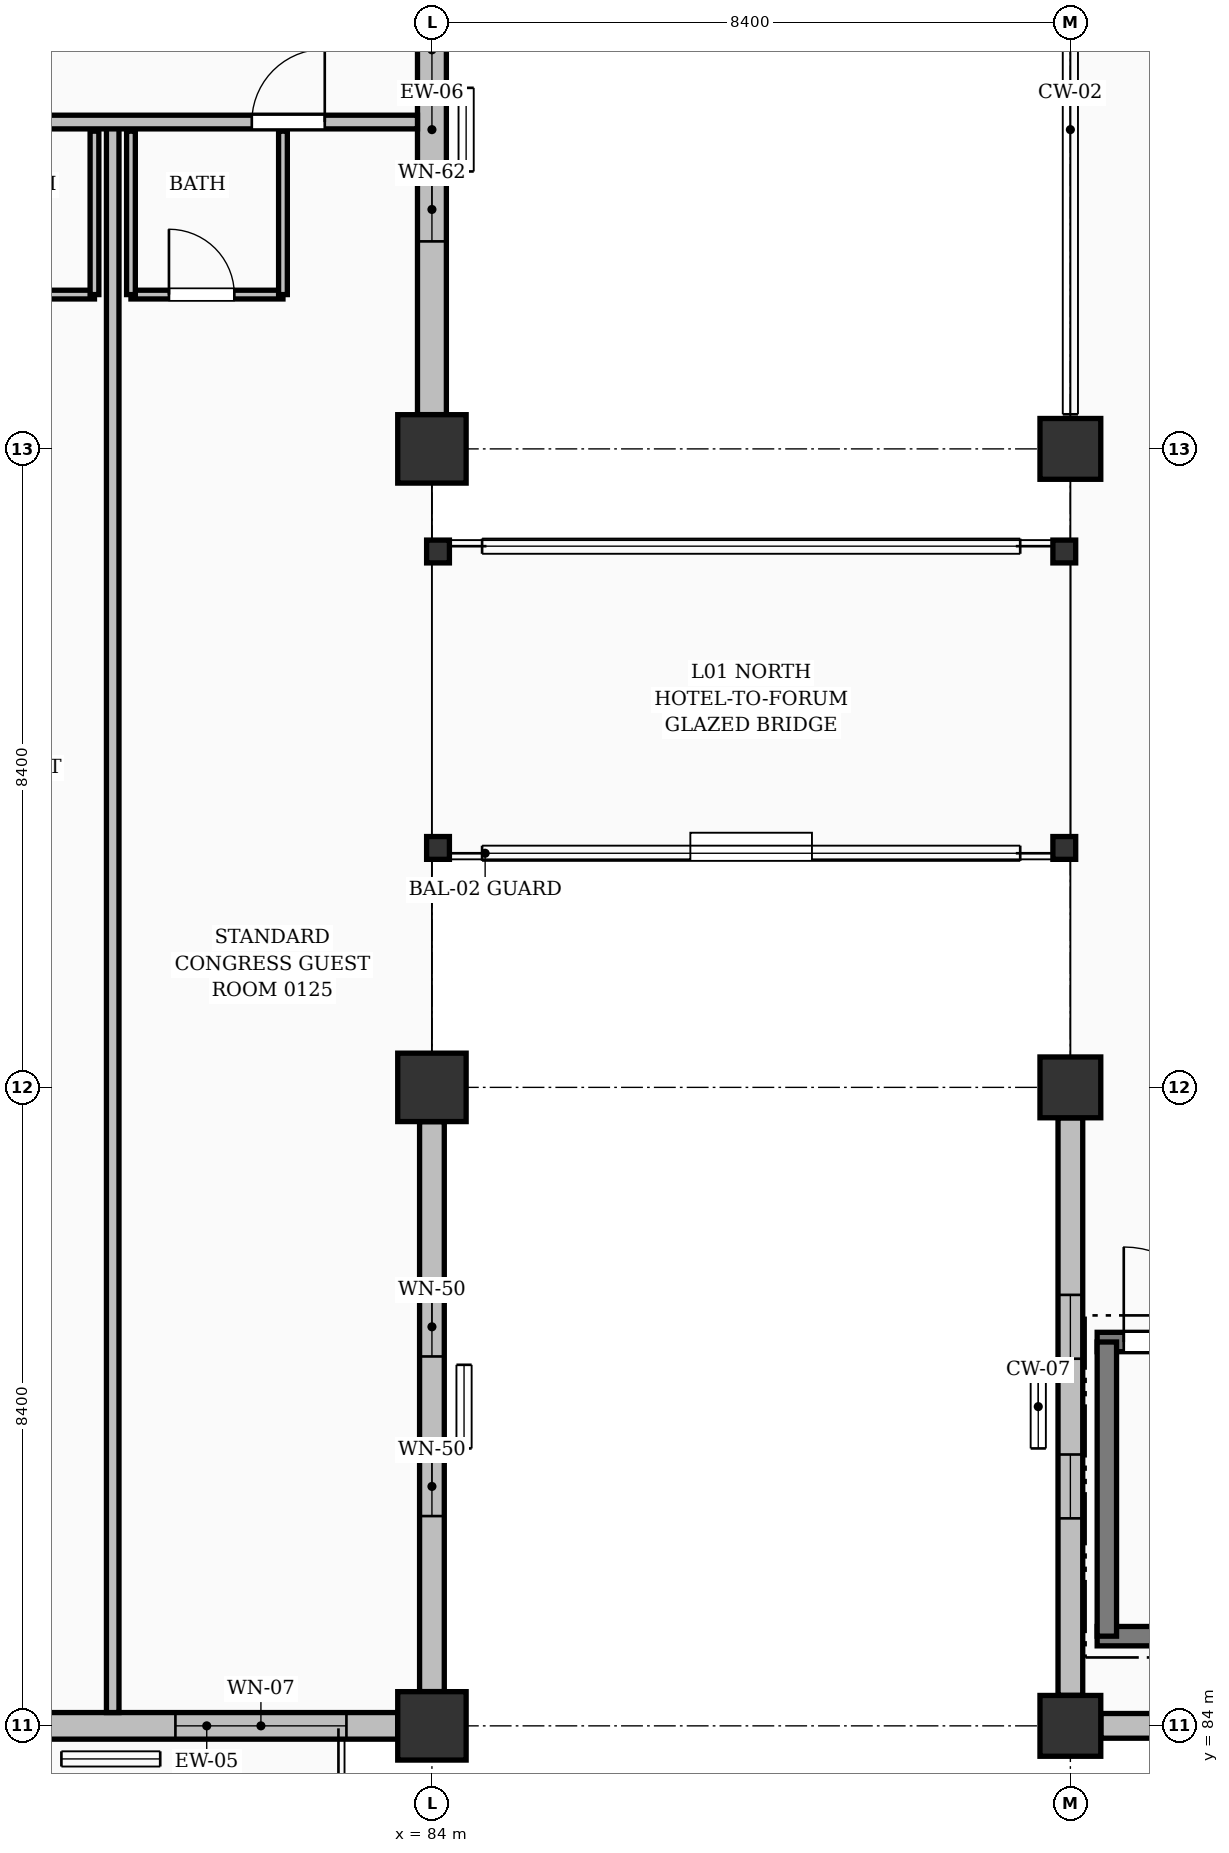
"""IFC4 building model, lengths in metres.
Left out: names, types, materials, properties, quantities, classifications, styles, units other than length and angle.
Written with IfcOpenShell. Run it as: python <this file> out.ifc"""

import sys

from ifc_helpers import new_model, si_unit, direction, frame, frame_2d, origin, origin_2d, place, context, subcontext, project, spatial, rectangle, hollow_rectangle, extrude, element, fill, save


model = new_model("IFC4")
c1 = context("Model", 3, precision=1e-05, world=origin(), true_north=direction((0.0, 1.0)))
c2 = subcontext(c1, "Body", "Model", "MODEL_VIEW")
j1 = project(units=[si_unit("LENGTHUNIT", "METRE"), si_unit("PLANEANGLEUNIT", "RADIAN")], contexts=[c1])
p1 = place(None, origin())
s1 = spatial("IfcSite", under=j1, at=p1, CompositionType="ELEMENT")
p2 = place(p1, origin())
s2 = spatial("IfcBuilding", under=s1, at=p2, CompositionType="ELEMENT")
p3 = place(p2, frame((0.0, 0.0, 3.92)))
s3 = spatial("IfcBuildingStorey", under=s2, at=p3, CompositionType="ELEMENT", Elevation=3.92)
for number, where, z_axis, x_axis in (
    (1, (84.0, 84.0, 0.0), (0.0, 0.0, 1.0), (1.0, 0.0, 0.0)),
    (2, (84.0, 92.4, 0.0), (0.0, 0.0, 1.0), (1.0, 0.0, 0.0)),
    (3, (84.0, 100.8, 0.0), (0.0, 0.0, 1.0), (1.0, 0.0, 0.0)),
):
    element("IfcColumn", number, at=place(p3, frame(where, z_axis=z_axis, x_axis=x_axis)), inside=s3, PredefinedType="COLUMN", context=c2, shape_type="SweptSolid", body=[
        extrude(rectangle(XDim=0.9, YDim=0.9, at=origin_2d()), origin(), (0.0, 0.0, 1.0), 3.64),
    ])
for number, where, z_axis, x_axis in (
    (4, (92.4, 84.0, 0.0), (0.0, 0.0, 1.0), (1.0, 0.0, 0.0)),
    (5, (92.4, 92.4, 0.0), (0.0, 0.0, 1.0), (1.0, 0.0, 0.0)),
    (6, (92.4, 100.8, 0.0), (0.0, 0.0, 1.0), (1.0, 0.0, 0.0)),
):
    element("IfcColumn", number, at=place(p3, frame(where, z_axis=z_axis, x_axis=x_axis)), inside=s3, PredefinedType="COLUMN", context=c2, shape_type="SweptSolid", body=[
        extrude(rectangle(XDim=0.8, YDim=0.8, at=origin_2d()), origin(), (0.0, 0.0, 1.0), 3.64),
    ])
for number, where, z_axis, x_axis in (
    (7, (84.08, 95.55, 0.0), (0.0, 0.0, 1.0), (1.0, 0.0, 0.0)),
    (8, (84.08, 99.45, 0.0), (0.0, 0.0, 1.0), (1.0, 0.0, 0.0)),
    (9, (92.32, 95.55, 0.0), (0.0, 0.0, 1.0), (1.0, 0.0, 0.0)),
    (10, (92.32, 99.45, 0.0), (0.0, 0.0, 1.0), (1.0, 0.0, 0.0)),
):
    element("IfcColumn", number, at=place(p3, frame(where, z_axis=z_axis, x_axis=x_axis)), inside=s3, PredefinedType="COLUMN", context=c2, shape_type="SweptSolid", body=[
        extrude(hollow_rectangle(XDim=0.3, YDim=0.3, WallThickness=0.016, at=origin_2d()), origin(), (0.0, 0.0, 1.0), 3.64),
    ])
p4 = place(p3, frame((92.801, 84.0, 0.0), z_axis=(0.0, 0.0, 1.0), x_axis=(1.0, 0.0, 0.0)))
e11 = element("IfcWall", 11, at=p4, inside=s3, PredefinedType="SOLIDWALL", context=c2, shape_type="SweptSolid", body=[
    extrude(rectangle(XDim=7.598, YDim=0.325, at=frame_2d((3.799, 0.0))), origin(), (0.0, 0.0, 1.0), 2.445),
])
p5 = place(p4, frame((2.399, 0.0, 0.3)))
e12 = element("IfcOpeningElement", 12, at=p5, cuts=e11, PredefinedType="OPENING", context=c2, shape_type="SweptSolid", body=[
    extrude(rectangle(XDim=0.7, YDim=1.9, at=frame_2d((0.35, 0.95))), frame((0.0, 0.172, 0.0), z_axis=(0.0, -1.0, 0.0), x_axis=(1.0, 0.0, 0.0)), (0.0, 0.0, 1.0), 0.345),
])
p6 = place(p4, frame((4.499, 0.0, 0.3)))
e13 = element("IfcOpeningElement", 13, at=p6, cuts=e11, PredefinedType="OPENING", context=c2, shape_type="SweptSolid", body=[
    extrude(rectangle(XDim=0.7, YDim=1.9, at=frame_2d((0.35, 0.95))), frame((0.0, 0.172, 0.0), z_axis=(0.0, -1.0, 0.0), x_axis=(1.0, 0.0, 0.0)), (0.0, 0.0, 1.0), 0.345),
])
p7 = place(p3, frame((92.4, 84.401, 0.0), z_axis=(0.0, 0.0, 1.0), x_axis=(0.0, 1.0, 0.0)))
e14 = element("IfcWall", 14, at=p7, inside=s3, PredefinedType="SOLIDWALL", context=c2, shape_type="SweptSolid", body=[
    extrude(rectangle(XDim=7.598, YDim=0.325, at=frame_2d((3.799, 0.0))), origin(), (0.0, 0.0, 1.0), 2.695),
])
p8 = place(p7, frame((2.329, 0.0, 0.3)))
e15 = element("IfcOpeningElement", 15, at=p8, cuts=e14, PredefinedType="OPENING", context=c2, shape_type="SweptSolid", body=[
    extrude(rectangle(XDim=0.84, YDim=1.85, at=frame_2d((0.42, 0.925))), frame((0.0, 0.172, 0.0), z_axis=(0.0, -1.0, 0.0), x_axis=(1.0, 0.0, 0.0)), (0.0, 0.0, 1.0), 0.345),
])
p9 = place(p7, frame((4.429, 0.0, 0.3)))
e16 = element("IfcOpeningElement", 16, at=p9, cuts=e14, PredefinedType="OPENING", context=c2, shape_type="SweptSolid", body=[
    extrude(rectangle(XDim=0.84, YDim=1.85, at=frame_2d((0.42, 0.925))), frame((0.0, 0.172, 0.0), z_axis=(0.0, -1.0, 0.0), x_axis=(1.0, 0.0, 0.0)), (0.0, 0.0, 1.0), 0.345),
])
p10 = place(p3, frame((76.001, 84.0, 0.0), z_axis=(0.0, 0.0, 1.0), x_axis=(1.0, 0.0, 0.0)))
e17 = element("IfcWall", 17, at=p10, inside=s3, PredefinedType="SOLIDWALL", context=c2, shape_type="SweptSolid", body=[
    extrude(rectangle(XDim=7.548, YDim=0.35, at=frame_2d((3.774, 0.0))), origin(), (0.0, 0.0, 1.0), 2.445),
])
p11 = place(p10, frame((0.974, 0.0, 0.0)))
e18 = element("IfcOpeningElement", 18, at=p11, cuts=e17, PredefinedType="OPENING", context=c2, shape_type="SweptSolid", body=[
    extrude(rectangle(XDim=1.55, YDim=2.08, at=frame_2d((0.775, 1.04))), frame((0.0, 0.185, 0.0), z_axis=(0.0, -1.0, 0.0), x_axis=(1.0, 0.0, 0.0)), (0.0, 0.0, 1.0), 0.37),
])
p12 = place(p10, frame((4.624, 0.0, 0.25)))
e19 = element("IfcOpeningElement", 19, at=p12, cuts=e17, PredefinedType="OPENING", context=c2, shape_type="SweptSolid", body=[
    extrude(rectangle(XDim=2.25, YDim=1.95, at=frame_2d((1.125, 0.975))), frame((0.0, 0.185, 0.0), z_axis=(0.0, -1.0, 0.0), x_axis=(1.0, 0.0, 0.0)), (0.0, 0.0, 1.0), 0.37),
])
p13 = place(p3, frame((84.0, 84.451, 0.0), z_axis=(0.0, 0.0, 1.0), x_axis=(0.0, 1.0, 0.0)))
e20 = element("IfcWall", 20, at=p13, inside=s3, PredefinedType="SOLIDWALL", context=c2, shape_type="SweptSolid", body=[
    extrude(rectangle(XDim=7.498, YDim=0.325, at=frame_2d((3.749, 0.0))), origin(), (0.0, 0.0, 1.0), 2.495),
])
p14 = place(p13, frame((2.309, 0.0, 0.3)))
e21 = element("IfcOpeningElement", 21, at=p14, cuts=e20, PredefinedType="OPENING", context=c2, shape_type="SweptSolid", body=[
    extrude(rectangle(XDim=0.78, YDim=1.95, at=frame_2d((0.39, 0.975))), frame((0.0, 0.172, 0.0), z_axis=(0.0, -1.0, 0.0), x_axis=(1.0, 0.0, 0.0)), (0.0, 0.0, 1.0), 0.345),
])
p15 = place(p13, frame((4.409, 0.0, 0.3)))
e22 = element("IfcOpeningElement", 22, at=p15, cuts=e20, PredefinedType="OPENING", context=c2, shape_type="SweptSolid", body=[
    extrude(rectangle(XDim=0.78, YDim=1.95, at=frame_2d((0.39, 0.975))), frame((0.0, 0.172, 0.0), z_axis=(0.0, -1.0, 0.0), x_axis=(1.0, 0.0, 0.0)), (0.0, 0.0, 1.0), 0.345),
])
p16 = place(p3, frame((84.0, 101.251, 0.0), z_axis=(0.0, 0.0, 1.0), x_axis=(0.0, 1.0, 0.0)))
e23 = element("IfcWall", 23, at=p16, inside=s3, PredefinedType="SOLIDWALL", context=c2, shape_type="SweptSolid", body=[
    extrude(rectangle(XDim=7.498, YDim=0.38, at=frame_2d((3.749, 0.0))), origin(), (0.0, 0.0, 1.0), 2.495),
])
p17 = place(p16, frame((2.279, 0.0, 0.3)))
e24 = element("IfcOpeningElement", 24, at=p17, cuts=e23, PredefinedType="OPENING", context=c2, shape_type="SweptSolid", body=[
    extrude(rectangle(XDim=0.84, YDim=1.75, at=frame_2d((0.42, 0.875))), frame((0.0, 0.2, 0.0), z_axis=(0.0, -1.0, 0.0), x_axis=(1.0, 0.0, 0.0)), (0.0, 0.0, 1.0), 0.4),
])
p18 = place(p16, frame((4.379, 0.0, 0.3)))
e25 = element("IfcOpeningElement", 25, at=p18, cuts=e23, PredefinedType="OPENING", context=c2, shape_type="SweptSolid", body=[
    extrude(rectangle(XDim=0.84, YDim=1.75, at=frame_2d((0.42, 0.875))), frame((0.0, 0.2, 0.0), z_axis=(0.0, -1.0, 0.0), x_axis=(1.0, 0.0, 0.0)), (0.0, 0.0, 1.0), 0.4),
])
p19 = place(p3, frame((92.752, 85.18, 0.0), z_axis=(0.0, 0.0, 1.0), x_axis=(1.0, 0.0, 0.0)))
e26 = element("IfcWall", 26, at=p19, inside=s3, PredefinedType="SOLIDWALL", context=c2, shape_type="SweptSolid", body=[
    extrude(rectangle(XDim=8.225, YDim=0.255, at=frame_2d((4.113, 0.0))), origin(), (0.0, 0.0, 1.0), 3.36),
])
p20 = place(p3, frame((92.752, 89.05, 0.0), z_axis=(0.0, 0.0, 1.0), x_axis=(1.0, 0.0, 0.0)))
e27 = element("IfcWall", 27, at=p20, inside=s3, PredefinedType="SOLIDWALL", context=c2, shape_type="SweptSolid", body=[
    extrude(rectangle(XDim=8.225, YDim=0.255, at=frame_2d((4.113, 0.0))), origin(), (0.0, 0.0, 1.0), 3.36),
])
p21 = place(p20, frame((0.35, 0.0, 0.0)))
e28 = element("IfcOpeningElement", 28, at=p21, cuts=e27, PredefinedType="OPENING", context=c2, shape_type="SweptSolid", body=[
    extrude(rectangle(XDim=1.25, YDim=2.2, at=frame_2d((0.625, 1.1))), frame((0.0, 0.137, 0.0), z_axis=(0.0, -1.0, 0.0), x_axis=(1.0, 0.0, 0.0)), (0.0, 0.0, 1.0), 0.275),
])
p22 = place(p3, frame((92.88, 85.18, 0.0), z_axis=(0.0, 0.0, 1.0), x_axis=(0.0, 1.0, 0.0)))
e29 = element("IfcWall", 29, at=p22, inside=s3, PredefinedType="SOLIDWALL", context=c2, shape_type="SweptSolid", body=[
    extrude(rectangle(XDim=3.87, YDim=0.255, at=frame_2d((1.935, 0.0))), origin(), (0.0, 0.0, 1.0), 3.36),
])
p23 = place(p3, frame((77.56, 102.83, 0.0), z_axis=(0.0, 0.0, 1.0), x_axis=(1.0, 0.0, 0.0)))
e30 = element("IfcWall", 30, at=p23, inside=s3, PredefinedType="PARTITIONING", context=c2, shape_type="SweptSolid", body=[
    extrude(rectangle(XDim=2.0, YDim=0.115, at=frame_2d((1.0, 0.0))), origin(), (0.0, 0.0, 1.0), 3.36),
])
p24 = place(p23, frame((0.5, 0.0, 0.0)))
e31 = element("IfcOpeningElement", 31, at=p24, cuts=e30, PredefinedType="OPENING", context=c2, shape_type="SweptSolid", body=[
    extrude(rectangle(XDim=0.86, YDim=2.05, at=frame_2d((0.43, 1.025))), frame((0.0, 0.067, 0.0), z_axis=(0.0, -1.0, 0.0), x_axis=(1.0, 0.0, 0.0)), (0.0, 0.0, 1.0), 0.135),
])
p25 = place(p3, frame((79.56, 102.83, 0.0), z_axis=(0.0, 0.0, 1.0), x_axis=(0.0, 1.0, 0.0)))
e32 = element("IfcWall", 32, at=p25, inside=s3, PredefinedType="PARTITIONING", context=c2, shape_type="SweptSolid", body=[
    extrude(rectangle(XDim=2.15, YDim=0.115, at=frame_2d((1.075, 0.0))), origin(), (0.0, 0.0, 1.0), 3.36),
])
p26 = place(p3, frame((80.04, 102.83, 0.0), z_axis=(0.0, 0.0, 1.0), x_axis=(1.0, 0.0, 0.0)))
e33 = element("IfcWall", 33, at=p26, inside=s3, PredefinedType="PARTITIONING", context=c2, shape_type="SweptSolid", body=[
    extrude(rectangle(XDim=2.0, YDim=0.115, at=frame_2d((1.0, 0.0))), origin(), (0.0, 0.0, 1.0), 3.36),
])
p27 = place(p26, frame((0.5, 0.0, 0.0)))
e34 = element("IfcOpeningElement", 34, at=p27, cuts=e33, PredefinedType="OPENING", context=c2, shape_type="SweptSolid", body=[
    extrude(rectangle(XDim=0.86, YDim=2.05, at=frame_2d((0.43, 1.025))), frame((0.0, 0.067, 0.0), z_axis=(0.0, -1.0, 0.0), x_axis=(1.0, 0.0, 0.0)), (0.0, 0.0, 1.0), 0.135),
])
for number, where, z_axis, x_axis in (
    (35, (80.04, 102.83, 0.0), (0.0, 0.0, 1.0), (0.0, 1.0, 0.0)),
    (36, (82.04, 102.83, 0.0), (0.0, 0.0, 1.0), (0.0, 1.0, 0.0)),
):
    element("IfcWall", number, at=place(p3, frame(where, z_axis=z_axis, x_axis=x_axis)), inside=s3, PredefinedType="PARTITIONING", context=c2, shape_type="SweptSolid", body=[
        extrude(rectangle(XDim=2.15, YDim=0.115, at=frame_2d((1.075, 0.0))), origin(), (0.0, 0.0, 1.0), 3.36),
    ])
p28 = place(p3, frame((79.8, 84.175, 0.0), z_axis=(0.0, 0.0, 1.0), x_axis=(0.0, 1.0, 0.0)))
e37 = element("IfcWall", 37, at=p28, inside=s3, PredefinedType="PARTITIONING", context=c2, shape_type="SweptSolid", body=[
    extrude(rectangle(XDim=20.925, YDim=0.165, at=frame_2d((10.462, 0.0))), origin(), (0.0, 0.0, 1.0), 3.36),
])
p29 = place(p3, frame((54.4, 105.1, 0.0), z_axis=(0.0, 0.0, 1.0), x_axis=(1.0, 0.0, 0.0)))
e38 = element("IfcWall", 38, at=p29, inside=s3, PredefinedType="PARTITIONING", context=c2, shape_type="SweptSolid", body=[
    extrude(rectangle(XDim=29.41, YDim=0.18, at=frame_2d((14.705, 0.0))), origin(), (0.0, 0.0, 1.0), 3.36),
])
p30 = place(p29, frame((2.03, 0.0, 0.0)))
e39 = element("IfcOpeningElement", 39, at=p30, cuts=e38, PredefinedType="OPENING", context=c2, shape_type="SweptSolid", body=[
    extrude(rectangle(XDim=0.96, YDim=2.15, at=frame_2d((0.48, 1.075))), frame((0.0, 0.1, 0.0), z_axis=(0.0, -1.0, 0.0), x_axis=(1.0, 0.0, 0.0)), (0.0, 0.0, 1.0), 0.2),
])
p31 = place(p29, frame((5.77, 0.0, 0.0)))
e40 = element("IfcOpeningElement", 40, at=p31, cuts=e38, PredefinedType="OPENING", context=c2, shape_type="SweptSolid", body=[
    extrude(rectangle(XDim=0.96, YDim=2.15, at=frame_2d((0.48, 1.075))), frame((0.0, 0.1, 0.0), z_axis=(0.0, -1.0, 0.0), x_axis=(1.0, 0.0, 0.0)), (0.0, 0.0, 1.0), 0.2),
])
p32 = place(p29, frame((10.43, 0.0, 0.0)))
e41 = element("IfcOpeningElement", 41, at=p32, cuts=e38, PredefinedType="OPENING", context=c2, shape_type="SweptSolid", body=[
    extrude(rectangle(XDim=0.96, YDim=2.15, at=frame_2d((0.48, 1.075))), frame((0.0, 0.1, 0.0), z_axis=(0.0, -1.0, 0.0), x_axis=(1.0, 0.0, 0.0)), (0.0, 0.0, 1.0), 0.2),
])
p33 = place(p29, frame((14.17, 0.0, 0.0)))
e42 = element("IfcOpeningElement", 42, at=p33, cuts=e38, PredefinedType="OPENING", context=c2, shape_type="SweptSolid", body=[
    extrude(rectangle(XDim=0.96, YDim=2.15, at=frame_2d((0.48, 1.075))), frame((0.0, 0.1, 0.0), z_axis=(0.0, -1.0, 0.0), x_axis=(1.0, 0.0, 0.0)), (0.0, 0.0, 1.0), 0.2),
])
p34 = place(p29, frame((18.83, 0.0, 0.0)))
e43 = element("IfcOpeningElement", 43, at=p34, cuts=e38, PredefinedType="OPENING", context=c2, shape_type="SweptSolid", body=[
    extrude(rectangle(XDim=0.96, YDim=2.15, at=frame_2d((0.48, 1.075))), frame((0.0, 0.1, 0.0), z_axis=(0.0, -1.0, 0.0), x_axis=(1.0, 0.0, 0.0)), (0.0, 0.0, 1.0), 0.2),
])
p35 = place(p29, frame((22.57, 0.0, 0.0)))
e44 = element("IfcOpeningElement", 44, at=p35, cuts=e38, PredefinedType="OPENING", context=c2, shape_type="SweptSolid", body=[
    extrude(rectangle(XDim=0.96, YDim=2.15, at=frame_2d((0.48, 1.075))), frame((0.0, 0.1, 0.0), z_axis=(0.0, -1.0, 0.0), x_axis=(1.0, 0.0, 0.0)), (0.0, 0.0, 1.0), 0.2),
])
p36 = place(p29, frame((27.23, 0.0, 0.0)))
e45 = element("IfcOpeningElement", 45, at=p36, cuts=e38, PredefinedType="OPENING", context=c2, shape_type="SweptSolid", body=[
    extrude(rectangle(XDim=0.96, YDim=2.15, at=frame_2d((0.48, 1.075))), frame((0.0, 0.1, 0.0), z_axis=(0.0, -1.0, 0.0), x_axis=(1.0, 0.0, 0.0)), (0.0, 0.0, 1.0), 0.2),
])
p37 = place(p8, origin())
e46 = element("IfcWindow", 46, at=p37, inside=s3, PartitioningType="SINGLE_PANEL", PredefinedType="WINDOW", context=c2, shape_type="SweptSolid", body=[
    extrude(rectangle(XDim=0.84, YDim=1.85, at=frame_2d((0.42, 0.925))), frame((0.0, 0.03, 0.0), z_axis=(0.0, -1.0, 0.0), x_axis=(1.0, 0.0, 0.0)), (0.0, 0.0, 1.0), 0.06),
])
fill(e15, e46)
p38 = place(p9, origin())
e47 = element("IfcWindow", 47, at=p38, inside=s3, PartitioningType="SINGLE_PANEL", PredefinedType="WINDOW", context=c2, shape_type="SweptSolid", body=[
    extrude(rectangle(XDim=0.84, YDim=1.85, at=frame_2d((0.42, 0.925))), frame((0.0, 0.03, 0.0), z_axis=(0.0, -1.0, 0.0), x_axis=(1.0, 0.0, 0.0)), (0.0, 0.0, 1.0), 0.06),
])
fill(e16, e47)
p39 = place(p12, origin())
e48 = element("IfcWindow", 48, at=p39, inside=s3, PartitioningType="DOUBLE_PANEL_VERTICAL", PredefinedType="WINDOW", context=c2, shape_type="SweptSolid", body=[
    extrude(rectangle(XDim=2.25, YDim=1.95, at=frame_2d((1.125, 0.975))), frame((0.0, 0.03, 0.0), z_axis=(0.0, -1.0, 0.0), x_axis=(1.0, 0.0, 0.0)), (0.0, 0.0, 1.0), 0.06),
])
fill(e19, e48)
p40 = place(p14, origin())
e49 = element("IfcWindow", 49, at=p40, inside=s3, PartitioningType="SINGLE_PANEL", PredefinedType="WINDOW", context=c2, shape_type="SweptSolid", body=[
    extrude(rectangle(XDim=0.78, YDim=1.95, at=frame_2d((0.39, 0.975))), frame((0.0, 0.03, 0.0), z_axis=(0.0, -1.0, 0.0), x_axis=(1.0, 0.0, 0.0)), (0.0, 0.0, 1.0), 0.06),
])
fill(e21, e49)
p41 = place(p15, origin())
e50 = element("IfcWindow", 50, at=p41, inside=s3, PartitioningType="SINGLE_PANEL", PredefinedType="WINDOW", context=c2, shape_type="SweptSolid", body=[
    extrude(rectangle(XDim=0.78, YDim=1.95, at=frame_2d((0.39, 0.975))), frame((0.0, 0.03, 0.0), z_axis=(0.0, -1.0, 0.0), x_axis=(1.0, 0.0, 0.0)), (0.0, 0.0, 1.0), 0.06),
])
fill(e22, e50)
p42 = place(p17, origin())
e51 = element("IfcWindow", 51, at=p42, inside=s3, PartitioningType="SINGLE_PANEL", PredefinedType="WINDOW", context=c2, shape_type="SweptSolid", body=[
    extrude(rectangle(XDim=0.84, YDim=1.75, at=frame_2d((0.42, 0.875))), frame((0.0, 0.03, 0.0), z_axis=(0.0, -1.0, 0.0), x_axis=(1.0, 0.0, 0.0)), (0.0, 0.0, 1.0), 0.06),
])
fill(e24, e51)
p43 = place(p18, origin())
e52 = element("IfcWindow", 52, at=p43, inside=s3, PartitioningType="SINGLE_PANEL", PredefinedType="WINDOW", context=c2, shape_type="SweptSolid", body=[
    extrude(rectangle(XDim=0.84, YDim=1.75, at=frame_2d((0.42, 0.875))), frame((0.0, 0.03, 0.0), z_axis=(0.0, -1.0, 0.0), x_axis=(1.0, 0.0, 0.0)), (0.0, 0.0, 1.0), 0.06),
])
fill(e25, e52)
p44 = place(p21, origin())
e53 = element("IfcDoor", 53, at=p44, inside=s3, OperationType="SINGLE_SWING_LEFT", PredefinedType="DOOR", context=c2, shape_type="SweptSolid", body=[
    extrude(rectangle(XDim=1.25, YDim=2.2, at=frame_2d((0.625, 1.1))), frame((0.0, 0.025, 0.0), z_axis=(0.0, -1.0, 0.0), x_axis=(1.0, 0.0, 0.0)), (0.0, 0.0, 1.0), 0.05),
])
fill(e28, e53)
p45 = place(p27, origin())
e54 = element("IfcDoor", 54, at=p45, inside=s3, OperationType="SINGLE_SWING_LEFT", PredefinedType="DOOR", context=c2, shape_type="SweptSolid", body=[
    extrude(rectangle(XDim=0.86, YDim=2.05, at=frame_2d((0.43, 1.025))), frame((0.0, 0.025, 0.0), z_axis=(0.0, -1.0, 0.0), x_axis=(1.0, 0.0, 0.0)), (0.0, 0.0, 1.0), 0.05),
])
fill(e34, e54)
p46 = place(p36, origin())
e55 = element("IfcDoor", 55, at=p46, inside=s3, OperationType="SINGLE_SWING_RIGHT", PredefinedType="DOOR", context=c2, shape_type="SweptSolid", body=[
    extrude(rectangle(XDim=0.96, YDim=2.15, at=frame_2d((0.48, 1.075))), frame((0.0, 0.025, 0.0), z_axis=(0.0, -1.0, 0.0), x_axis=(1.0, 0.0, 0.0)), (0.0, 0.0, 1.0), 0.05),
])
fill(e45, e55)
save(model, sys.argv[1])
